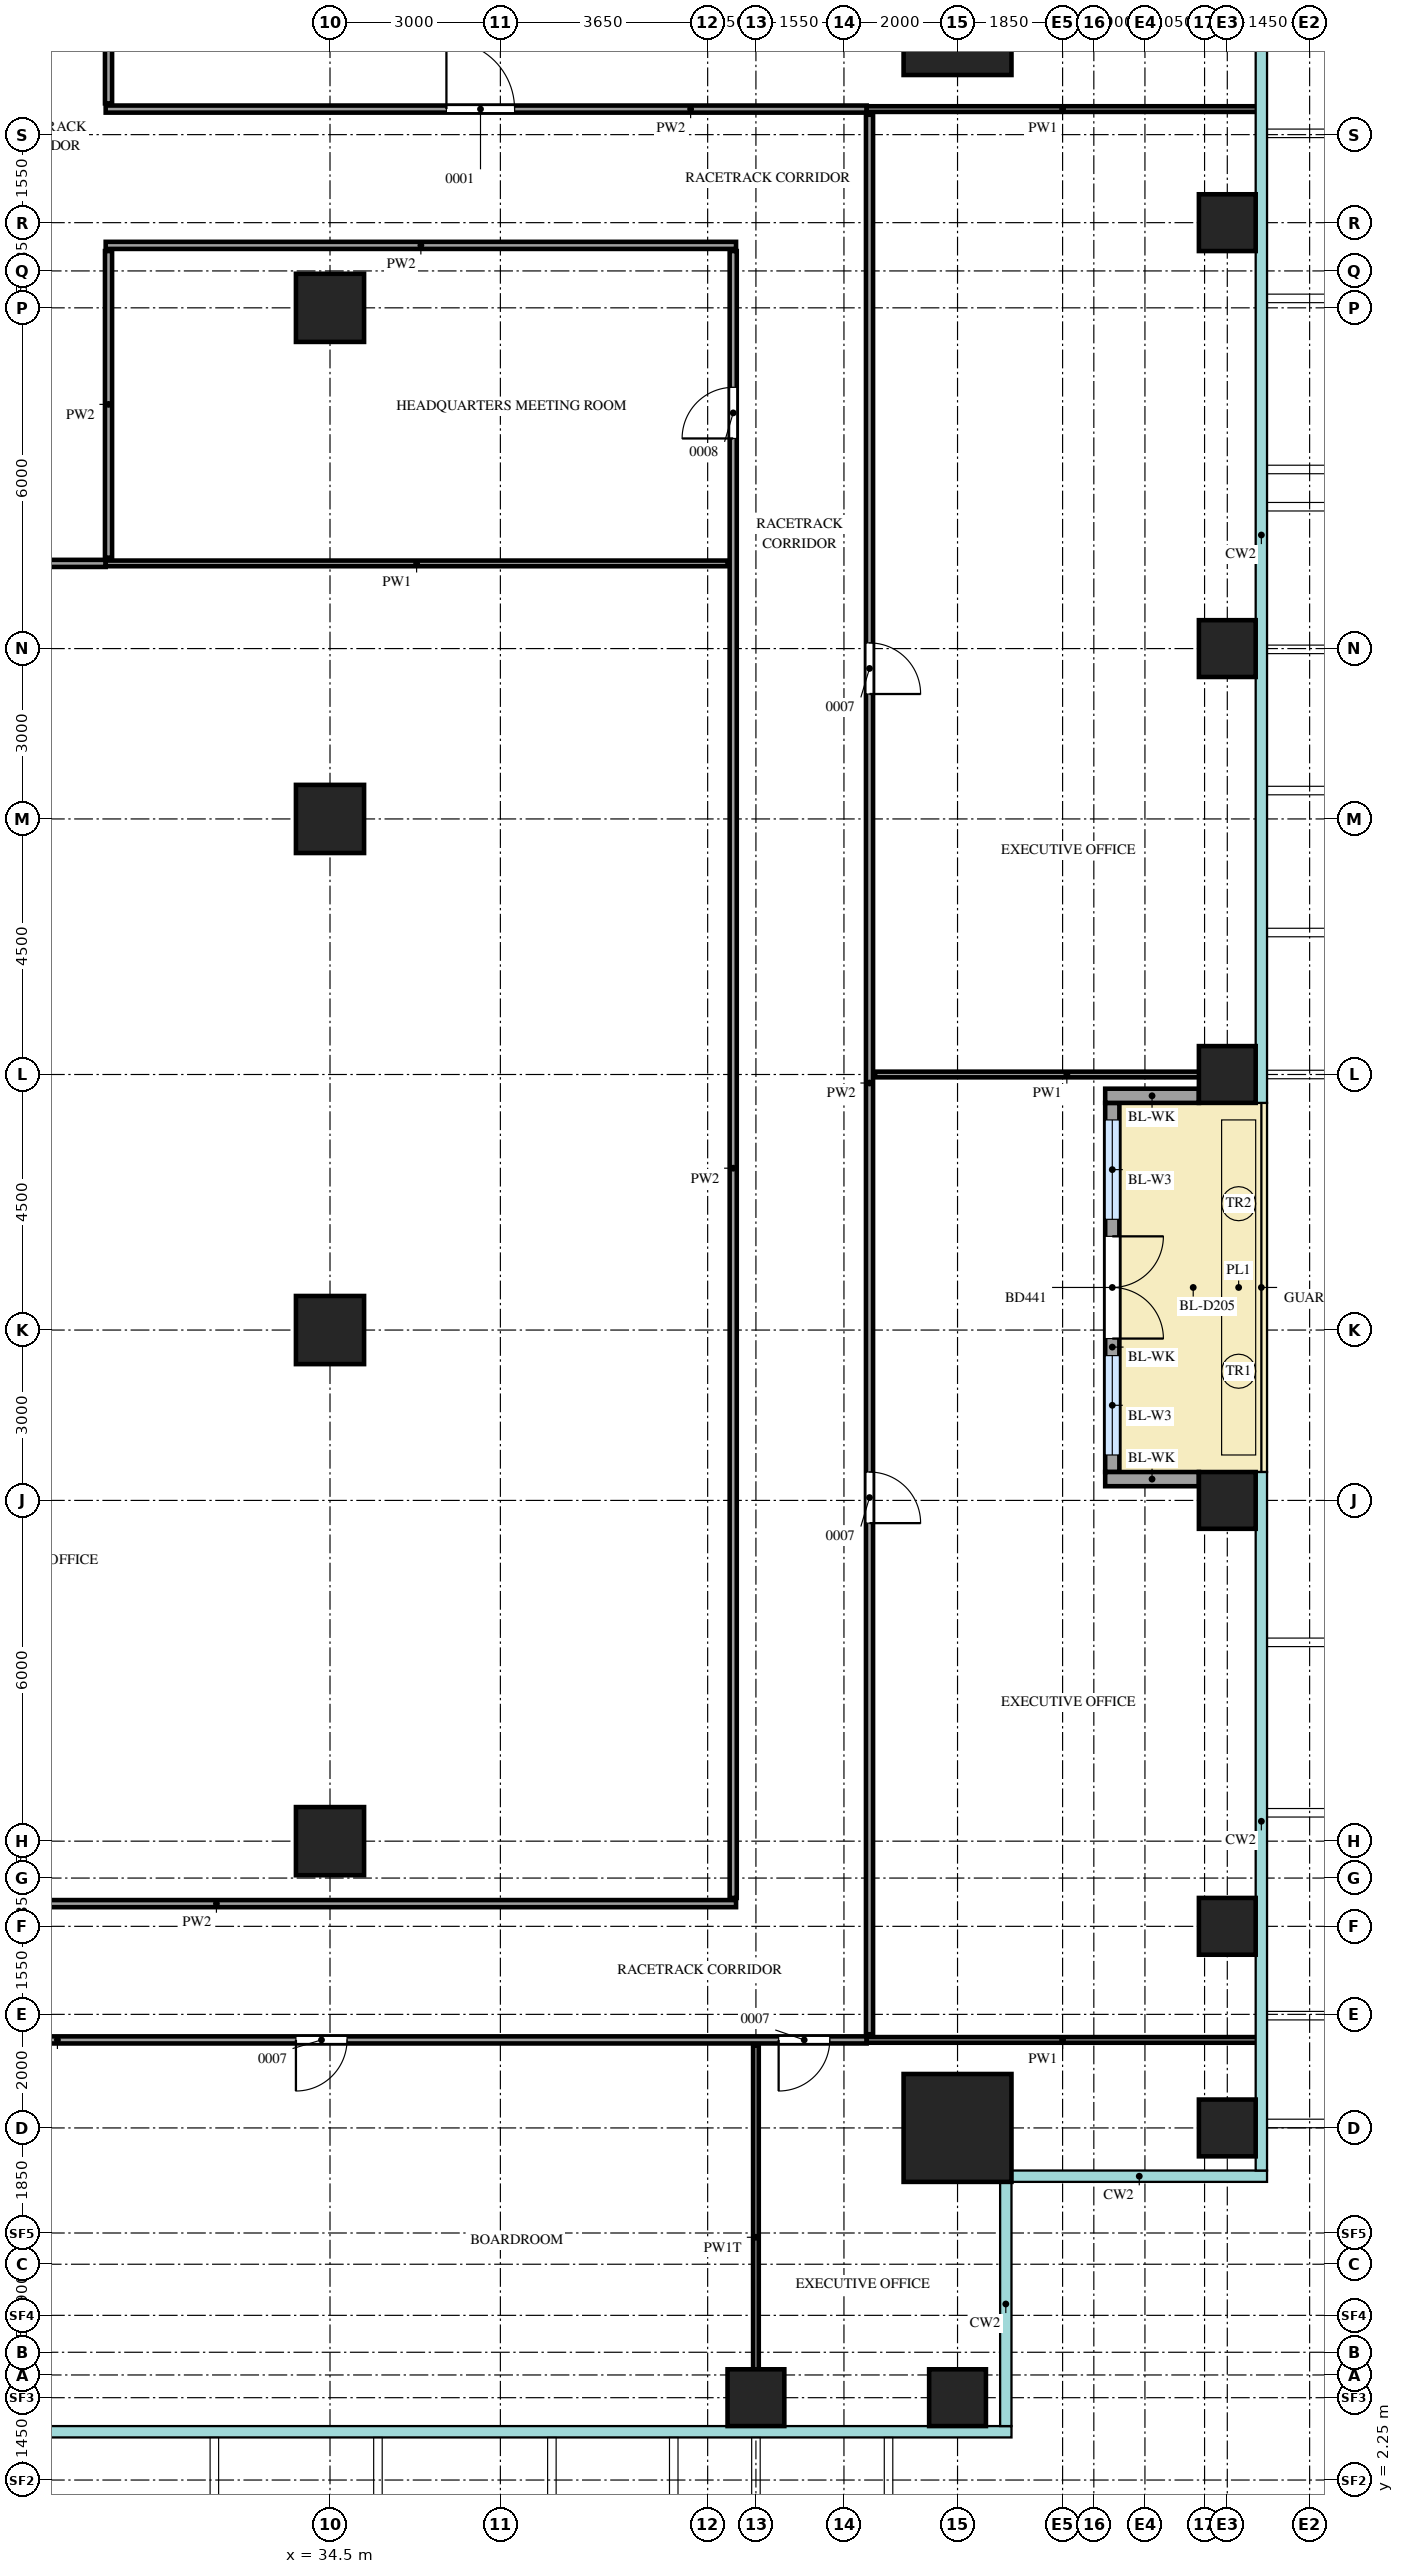
"""IFC4 building model, lengths in metres.
Left out: names, types, materials, properties, quantities, classifications, styles, units other than length and angle.
Written with IfcOpenShell. Run it as: python <this file> out.ifc"""

import sys

from ifc_helpers import new_model, si_unit, direction, frame, frame_2d, origin, origin_2d, place, context, subcontext, project, spatial, rectangle, extrude, source, transform, mapped, element, fill, save


model = new_model("IFC4")
c1 = context("Model", 3, precision=1e-05, world=origin(), true_north=direction((0.0, 1.0)))
c2 = subcontext(c1, "Body", "Model", "MODEL_VIEW")
j1 = project(units=[si_unit("LENGTHUNIT", "METRE"), si_unit("PLANEANGLEUNIT", "RADIAN")], contexts=[c1])
p1 = place(None, origin())
s1 = spatial("IfcSite", under=j1, at=p1, CompositionType="ELEMENT")
p2 = place(p1, origin())
s2 = spatial("IfcBuilding", under=s1, at=p2, CompositionType="ELEMENT")
p3 = place(p2, frame((0.0, 0.0, 200.7)))
s3 = spatial("IfcBuildingStorey", under=s2, at=p3, CompositionType="ELEMENT", Elevation=200.7)
m1 = source(origin(), c2, "Body", "SweptSolid", [
    extrude(rectangle(XDim=1.9, YDim=1.9, at=origin_2d()), origin(), (0.0, 0.0, 1.0), 4.0),
])
for number, where, z_axis, x_axis in (
    (1, (45.55, 45.55, 0.0), (0.0, 0.0, 1.0), (1.0, 0.0, 0.0)),
    (2, (45.55, 8.45, 0.0), (0.0, 0.0, 1.0), (1.0, 0.0, 0.0)),
):
    element("IfcColumn", number, at=place(p3, frame(where, z_axis=z_axis, x_axis=x_axis)), inside=s3, PredefinedType="COLUMN", context=c2, shape_type="MappedRepresentation", body=[
        mapped(m1, transform((0.0, 0.0, 0.0))),
    ])
m2 = source(origin(), c2, "Body", "SweptSolid", [
    extrude(rectangle(XDim=1.0, YDim=1.0, at=origin_2d()), origin(), (0.0, 0.0, 1.0), 3.75),
])
for number, where, z_axis, x_axis in (
    (3, (42.0, 3.7, 0.0), (0.0, 0.0, 1.0), (1.0, 0.0, 0.0)),
    (4, (45.55, 3.7, 0.0), (0.0, 0.0, 1.0), (1.0, 0.0, 0.0)),
    (5, (50.3, 8.45, 0.0), (0.0, 0.0, 1.0), (1.0, 0.0, 0.0)),
    (6, (50.3, 12.0, 0.0), (0.0, 0.0, 1.0), (1.0, 0.0, 0.0)),
    (7, (50.3, 19.5, 0.0), (0.0, 0.0, 1.0), (1.0, 0.0, 0.0)),
    (8, (50.3, 27.0, 0.0), (0.0, 0.0, 1.0), (1.0, 0.0, 0.0)),
    (9, (50.3, 34.5, 0.0), (0.0, 0.0, 1.0), (1.0, 0.0, 0.0)),
    (10, (50.3, 42.0, 0.0), (0.0, 0.0, 1.0), (1.0, 0.0, 0.0)),
):
    element("IfcColumn", number, at=place(p3, frame(where, z_axis=z_axis, x_axis=x_axis)), inside=s3, PredefinedType="COLUMN", context=c2, shape_type="MappedRepresentation", body=[
        mapped(m2, transform((0.0, 0.0, 0.0))),
    ])
m3 = source(origin(), c2, "Body", "SweptSolid", [
    extrude(rectangle(XDim=1.2, YDim=1.2, at=origin_2d()), origin(), (0.0, 0.0, 1.0), 3.75),
])
for number, where, z_axis, x_axis in (
    (11, (34.5, 13.5, 0.0), (0.0, 0.0, 1.0), (1.0, 0.0, 0.0)),
    (12, (34.5, 22.5, 0.0), (0.0, 0.0, 1.0), (1.0, 0.0, 0.0)),
    (13, (34.5, 31.5, 0.0), (0.0, 0.0, 1.0), (1.0, 0.0, 0.0)),
    (14, (34.5, 40.5, 0.0), (0.0, 0.0, 1.0), (1.0, 0.0, 0.0)),
):
    element("IfcColumn", number, at=place(p3, frame(where, z_axis=z_axis, x_axis=x_axis)), inside=s3, PredefinedType="COLUMN", context=c2, shape_type="MappedRepresentation", body=[
        mapped(m3, transform((0.0, 0.0, 0.0))),
    ])
m4 = source(origin(), c2, "Body", "SweptSolid", [
    extrude(rectangle(XDim=6.5, YDim=0.25, at=frame_2d((3.25, 0.0))), origin(), (0.0, 0.0, 1.0), 3.15),
])
p4 = place(p3, frame((48.275, 20.0, 0.0), z_axis=(0.0, 0.0, 1.0), x_axis=(0.0, 1.0, 0.0)))
e15 = element("IfcWall", 15, at=p4, inside=s3, PredefinedType="SOLIDWALL", context=c2, shape_type="MappedRepresentation", body=[
    mapped(m4, transform((0.0, 0.0, 0.0))),
])
m5 = source(origin(), c2, "Body", "SweptSolid", [
    extrude(rectangle(XDim=1.75, YDim=2.4, at=frame_2d((0.875, 1.2))), frame((0.0, 0.135, 0.0), z_axis=(0.0, -1.0, 0.0), x_axis=(1.0, 0.0, 0.0)), (0.0, 0.0, 1.0), 0.27),
])
p5 = place(p4, frame((0.3, 0.0, 0.0)))
e16 = element("IfcOpeningElement", 16, at=p5, cuts=e15, PredefinedType="OPENING", context=c2, shape_type="MappedRepresentation", body=[
    mapped(m5, transform((0.0, 0.0, 0.0))),
])
p6 = place(p4, frame((4.45, 0.0, 0.0)))
e17 = element("IfcOpeningElement", 17, at=p6, cuts=e15, PredefinedType="OPENING", context=c2, shape_type="MappedRepresentation", body=[
    mapped(m5, transform((0.0, 0.0, 0.0))),
])
m6 = source(origin(), c2, "Body", "SweptSolid", [
    extrude(rectangle(XDim=1.8, YDim=2.4, at=frame_2d((0.9, 1.2))), frame((0.0, 0.135, 0.0), z_axis=(0.0, -1.0, 0.0), x_axis=(1.0, 0.0, 0.0)), (0.0, 0.0, 1.0), 0.27),
])
p7 = place(p4, frame((2.35, 0.0, 0.0)))
e18 = element("IfcOpeningElement", 18, at=p7, cuts=e15, PredefinedType="OPENING", context=c2, shape_type="MappedRepresentation", body=[
    mapped(m6, transform((0.0, 0.0, 0.0))),
])
m7 = source(origin(), c2, "Body", "SweptSolid", [
    extrude(rectangle(XDim=1.65, YDim=0.25, at=frame_2d((0.825, 0.0))), origin(), (0.0, 0.0, 1.0), 3.15),
])
for number, where, z_axis, x_axis in (
    (19, (49.8, 19.875, 0.0), (0.0, 0.0, 1.0), (-1.0, 0.0, 0.0)),
    (20, (49.8, 26.625, 0.0), (0.0, 0.0, 1.0), (-1.0, 0.0, 0.0)),
):
    element("IfcWall", number, at=place(p3, frame(where, z_axis=z_axis, x_axis=x_axis)), inside=s3, PredefinedType="SOLIDWALL", context=c2, shape_type="MappedRepresentation", body=[
        mapped(m7, transform((0.0, 0.0, 0.0))),
    ])
m8 = source(origin(), c2, "Body", "SweptSolid", [
    extrude(rectangle(XDim=6.75, YDim=0.1, at=frame_2d((3.375, 0.0))), origin(), (0.0, 0.0, 1.0), 3.3),
])
p8 = place(p3, frame((42.0, 3.15, 0.0), z_axis=(0.0, 0.0, 1.0), x_axis=(0.0, 1.0, 0.0)))
e21 = element("IfcWall", 21, at=p8, inside=s3, PredefinedType="PARTITIONING", context=c2, shape_type="MappedRepresentation", body=[
    mapped(m8, transform((0.0, 0.0, 0.0))),
])
m9 = source(origin(), c2, "Body", "SweptSolid", [
    extrude(rectangle(XDim=20.6, YDim=0.125, at=frame_2d((10.3, 0.0))), origin(), (0.0, 0.0, 1.0), 3.8),
])
p9 = place(p3, frame((23.35, 10.0, 0.0), z_axis=(0.0, 0.0, 1.0), x_axis=(1.0, 0.0, 0.0)))
e22 = element("IfcWall", 22, at=p9, inside=s3, PredefinedType="PARTITIONING", context=c2, shape_type="MappedRepresentation", body=[
    mapped(m9, transform((0.0, 0.0, 0.0))),
])
m10 = source(origin(), c2, "Body", "SweptSolid", [
    extrude(rectangle(XDim=0.9, YDim=2.1, at=frame_2d((0.45, 1.05))), frame((0.0, 0.073, 0.0), z_axis=(0.0, -1.0, 0.0), x_axis=(1.0, 0.0, 0.0)), (0.0, 0.0, 1.0), 0.145),
])
p10 = place(p9, frame((1.25, 0.0, 0.0)))
e23 = element("IfcOpeningElement", 23, at=p10, cuts=e22, PredefinedType="OPENING", context=c2, shape_type="MappedRepresentation", body=[
    mapped(m10, transform((0.0, 0.0, 0.0))),
])
p11 = place(p9, frame((10.55, 0.0, 0.0)))
e24 = element("IfcOpeningElement", 24, at=p11, cuts=e22, PredefinedType="OPENING", context=c2, shape_type="MappedRepresentation", body=[
    mapped(m10, transform((0.0, 0.0, 0.0))),
])
p12 = place(p9, frame((19.05, 0.0, 0.0)))
e25 = element("IfcOpeningElement", 25, at=p12, cuts=e22, PredefinedType="OPENING", context=c2, shape_type="MappedRepresentation", body=[
    mapped(m10, transform((0.0, 0.0, 0.0))),
])
m11 = source(origin(), c2, "Body", "SweptSolid", [
    extrude(rectangle(XDim=6.9, YDim=0.1, at=frame_2d((3.45, 0.0))), origin(), (0.0, 0.0, 1.0), 3.8),
])
p13 = place(p3, frame((43.95, 10.0, 0.0), z_axis=(0.0, 0.0, 1.0), x_axis=(1.0, 0.0, 0.0)))
e26 = element("IfcWall", 26, at=p13, inside=s3, PredefinedType="PARTITIONING", context=c2, shape_type="MappedRepresentation", body=[
    mapped(m11, transform((0.0, 0.0, 0.0))),
])
m12 = source(origin(), c2, "Body", "SweptSolid", [
    extrude(rectangle(XDim=33.8, YDim=0.125, at=frame_2d((16.9, 0.0))), origin(), (0.0, 0.0, 1.0), 3.8),
])
p14 = place(p3, frame((44.0, 10.1, 0.0), z_axis=(0.0, 0.0, 1.0), x_axis=(0.0, 1.0, 0.0)))
e27 = element("IfcWall", 27, at=p14, inside=s3, PredefinedType="PARTITIONING", context=c2, shape_type="MappedRepresentation", body=[
    mapped(m12, transform((0.0, 0.0, 0.0))),
])
p15 = place(p14, frame((9.0, 0.0, 0.0)))
e28 = element("IfcOpeningElement", 28, at=p15, cuts=e27, PredefinedType="OPENING", context=c2, shape_type="MappedRepresentation", body=[
    mapped(m10, transform((0.0, 0.0, 0.0))),
])
p16 = place(p14, frame((23.6, 0.0, 0.0)))
e29 = element("IfcOpeningElement", 29, at=p16, cuts=e27, PredefinedType="OPENING", context=c2, shape_type="MappedRepresentation", body=[
    mapped(m10, transform((0.0, 0.0, 0.0))),
])
m13 = source(origin(), c2, "Body", "SweptSolid", [
    extrude(rectangle(XDim=18.3, YDim=0.125, at=frame_2d((9.15, 0.0))), origin(), (0.0, 0.0, 1.0), 3.8),
])
p17 = place(p3, frame((23.35, 12.4, 0.0), z_axis=(0.0, 0.0, 1.0), x_axis=(1.0, 0.0, 0.0)))
e30 = element("IfcWall", 30, at=p17, inside=s3, PredefinedType="PARTITIONING", context=c2, shape_type="MappedRepresentation", body=[
    mapped(m13, transform((0.0, 0.0, 0.0))),
])
m14 = source(origin(), c2, "Body", "SweptSolid", [
    extrude(rectangle(XDim=29.0, YDim=0.125, at=frame_2d((14.5, 0.0))), origin(), (0.0, 0.0, 1.0), 3.8),
])
p18 = place(p3, frame((41.6, 12.5, 0.0), z_axis=(0.0, 0.0, 1.0), x_axis=(0.0, 1.0, 0.0)))
e31 = element("IfcWall", 31, at=p18, inside=s3, PredefinedType="PARTITIONING", context=c2, shape_type="MappedRepresentation", body=[
    mapped(m14, transform((0.0, 0.0, 0.0))),
])
p19 = place(p18, frame((25.7, 0.0, 0.0)))
e32 = element("IfcOpeningElement", 32, at=p19, cuts=e31, PredefinedType="OPENING", context=c2, shape_type="MappedRepresentation", body=[
    mapped(m10, transform((0.0, 0.0, 0.0))),
])
m15 = source(origin(), c2, "Body", "SweptSolid", [
    extrude(rectangle(XDim=6.75, YDim=0.1, at=frame_2d((3.375, 0.0))), origin(), (0.0, 0.0, 1.0), 3.8),
])
p20 = place(p3, frame((44.1, 27.0, 0.0), z_axis=(0.0, 0.0, 1.0), x_axis=(1.0, 0.0, 0.0)))
e33 = element("IfcWall", 33, at=p20, inside=s3, PredefinedType="PARTITIONING", context=c2, shape_type="MappedRepresentation", body=[
    mapped(m15, transform((0.0, 0.0, 0.0))),
])
m16 = source(origin(), c2, "Body", "SweptSolid", [
    extrude(rectangle(XDim=7.2, YDim=0.125, at=frame_2d((3.6, 0.0))), origin(), (0.0, 0.0, 1.0), 3.8),
])
p21 = place(p3, frame((23.35, 36.0, 0.0), z_axis=(0.0, 0.0, 1.0), x_axis=(1.0, 0.0, 0.0)))
e34 = element("IfcWall", 34, at=p21, inside=s3, PredefinedType="PARTITIONING", context=c2, shape_type="MappedRepresentation", body=[
    mapped(m16, transform((0.0, 0.0, 0.0))),
])
m17 = source(origin(), c2, "Body", "SweptSolid", [
    extrude(rectangle(XDim=10.95, YDim=0.1, at=frame_2d((5.475, 0.0))), origin(), (0.0, 0.0, 1.0), 3.8),
])
p22 = place(p3, frame((30.55, 36.0, 0.0), z_axis=(0.0, 0.0, 1.0), x_axis=(1.0, 0.0, 0.0)))
e35 = element("IfcWall", 35, at=p22, inside=s3, PredefinedType="PARTITIONING", context=c2, shape_type="MappedRepresentation", body=[
    mapped(m17, transform((0.0, 0.0, 0.0))),
])
m18 = source(origin(), c2, "Body", "SweptSolid", [
    extrude(rectangle(XDim=5.4, YDim=0.125, at=frame_2d((2.7, 0.0))), origin(), (0.0, 0.0, 1.0), 3.8),
])
p23 = place(p3, frame((30.6, 36.1, 0.0), z_axis=(0.0, 0.0, 1.0), x_axis=(0.0, 1.0, 0.0)))
e36 = element("IfcWall", 36, at=p23, inside=s3, PredefinedType="PARTITIONING", context=c2, shape_type="MappedRepresentation", body=[
    mapped(m18, transform((0.0, 0.0, 0.0))),
])
m19 = source(origin(), c2, "Body", "SweptSolid", [
    extrude(rectangle(XDim=11.1, YDim=0.125, at=frame_2d((5.55, 0.0))), origin(), (0.0, 0.0, 1.0), 3.8),
])
p24 = place(p3, frame((30.55, 41.6, 0.0), z_axis=(0.0, 0.0, 1.0), x_axis=(1.0, 0.0, 0.0)))
e37 = element("IfcWall", 37, at=p24, inside=s3, PredefinedType="PARTITIONING", context=c2, shape_type="MappedRepresentation", body=[
    mapped(m19, transform((0.0, 0.0, 0.0))),
])
m20 = source(origin(), c2, "Body", "SweptSolid", [
    extrude(rectangle(XDim=13.4, YDim=0.125, at=frame_2d((6.7, 0.0))), origin(), (0.0, 0.0, 1.0), 3.8),
])
p25 = place(p3, frame((30.55, 44.0, 0.0), z_axis=(0.0, 0.0, 1.0), x_axis=(1.0, 0.0, 0.0)))
e38 = element("IfcWall", 38, at=p25, inside=s3, PredefinedType="PARTITIONING", context=c2, shape_type="MappedRepresentation", body=[
    mapped(m20, transform((0.0, 0.0, 0.0))),
])
m21 = source(origin(), c2, "Body", "SweptSolid", [
    extrude(rectangle(XDim=1.2, YDim=2.1, at=frame_2d((0.6, 1.05))), frame((0.0, 0.073, 0.0), z_axis=(0.0, -1.0, 0.0), x_axis=(1.0, 0.0, 0.0)), (0.0, 0.0, 1.0), 0.145),
])
p26 = place(p25, frame((6.0, 0.0, 0.0)))
e39 = element("IfcOpeningElement", 39, at=p26, cuts=e38, PredefinedType="OPENING", context=c2, shape_type="MappedRepresentation", body=[
    mapped(m21, transform((0.0, 0.0, 0.0))),
])
p27 = place(p3, frame((43.95, 44.0, 0.0), z_axis=(0.0, 0.0, 1.0), x_axis=(1.0, 0.0, 0.0)))
e40 = element("IfcWall", 40, at=p27, inside=s3, PredefinedType="PARTITIONING", context=c2, shape_type="MappedRepresentation", body=[
    mapped(m11, transform((0.0, 0.0, 0.0))),
])
m22 = source(origin(), c2, "Body", "SweptSolid", [
    extrude(rectangle(XDim=3.85, YDim=0.125, at=frame_2d((1.925, 0.0))), origin(), (0.0, 0.0, 1.0), 3.8),
])
p28 = place(p3, frame((30.6, 44.1, 0.0), z_axis=(0.0, 0.0, 1.0), x_axis=(0.0, 1.0, 0.0)))
e41 = element("IfcWall", 41, at=p28, inside=s3, PredefinedType="PARTITIONING", context=c2, shape_type="MappedRepresentation", body=[
    mapped(m22, transform((0.0, 0.0, 0.0))),
])
m23 = source(origin(), c2, "Body", "SweptSolid", [
    extrude(rectangle(XDim=1.75, YDim=2.4, at=frame_2d((0.875, 1.2))), frame((0.0, 0.03, 0.0), z_axis=(0.0, -1.0, 0.0), x_axis=(1.0, 0.0, 0.0)), (0.0, 0.0, 1.0), 0.06),
])
p29 = place(p5, origin())
e42 = element("IfcWindow", 42, at=p29, inside=s3, PartitioningType="SINGLE_PANEL", PredefinedType="WINDOW", context=c2, shape_type="MappedRepresentation", body=[
    mapped(m23, transform((0.0, 0.0, 0.0))),
])
fill(e16, e42)
p30 = place(p6, origin())
e43 = element("IfcWindow", 43, at=p30, inside=s3, PartitioningType="SINGLE_PANEL", PredefinedType="WINDOW", context=c2, shape_type="MappedRepresentation", body=[
    mapped(m23, transform((0.0, 0.0, 0.0))),
])
fill(e17, e43)
m24 = source(origin(), c2, "Body", "SweptSolid", [
    extrude(rectangle(XDim=1.8, YDim=2.4, at=frame_2d((0.9, 1.2))), frame((0.0, 0.025, 0.0), z_axis=(0.0, -1.0, 0.0), x_axis=(1.0, 0.0, 0.0)), (0.0, 0.0, 1.0), 0.05),
])
p31 = place(p7, origin())
e44 = element("IfcDoor", 44, at=p31, inside=s3, OperationType="DOUBLE_DOOR_DOUBLE_SWING", PredefinedType="DOOR", context=c2, shape_type="MappedRepresentation", body=[
    mapped(m24, transform((0.0, 0.0, 0.0))),
])
fill(e18, e44)
m25 = source(origin(), c2, "Body", "SweptSolid", [
    extrude(rectangle(XDim=0.9, YDim=2.1, at=frame_2d((0.45, 1.05))), frame((0.0, 0.025, 0.0), z_axis=(0.0, -1.0, 0.0), x_axis=(1.0, 0.0, 0.0)), (0.0, 0.0, 1.0), 0.05),
])
p32 = place(p11, origin())
e45 = element("IfcDoor", 45, at=p32, inside=s3, OperationType="SINGLE_SWING_LEFT", PredefinedType="DOOR", context=c2, shape_type="MappedRepresentation", body=[
    mapped(m25, transform((0.0, 0.0, 0.0))),
])
fill(e24, e45)
p33 = place(p12, origin())
e46 = element("IfcDoor", 46, at=p33, inside=s3, OperationType="SINGLE_SWING_LEFT", PredefinedType="DOOR", context=c2, shape_type="MappedRepresentation", body=[
    mapped(m25, transform((0.0, 0.0, 0.0))),
])
fill(e25, e46)
p34 = place(p15, origin())
e47 = element("IfcDoor", 47, at=p34, inside=s3, OperationType="SINGLE_SWING_LEFT", PredefinedType="DOOR", context=c2, shape_type="MappedRepresentation", body=[
    mapped(m25, transform((0.0, 0.0, 0.0))),
])
fill(e28, e47)
p35 = place(p16, origin())
e48 = element("IfcDoor", 48, at=p35, inside=s3, OperationType="SINGLE_SWING_LEFT", PredefinedType="DOOR", context=c2, shape_type="MappedRepresentation", body=[
    mapped(m25, transform((0.0, 0.0, 0.0))),
])
fill(e29, e48)
m26 = source(origin(), c2, "Body", "SweptSolid", [
    extrude(rectangle(XDim=1.2, YDim=2.1, at=frame_2d((0.6, 1.05))), frame((0.0, 0.025, 0.0), z_axis=(0.0, -1.0, 0.0), x_axis=(1.0, 0.0, 0.0)), (0.0, 0.0, 1.0), 0.05),
])
p36 = place(p26, origin())
e49 = element("IfcDoor", 49, at=p36, inside=s3, OperationType="SINGLE_SWING_RIGHT", PredefinedType="DOOR", context=c2, shape_type="MappedRepresentation", body=[
    mapped(m26, transform((0.0, 0.0, 0.0))),
])
fill(e39, e49)
p37 = place(p19, origin())
e50 = element("IfcDoor", 50, at=p37, inside=s3, OperationType="SINGLE_SWING_RIGHT", PredefinedType="DOOR", context=c2, shape_type="MappedRepresentation", body=[
    mapped(m25, transform((0.0, 0.0, 0.0))),
])
fill(e32, e50)
save(model, sys.argv[1])
